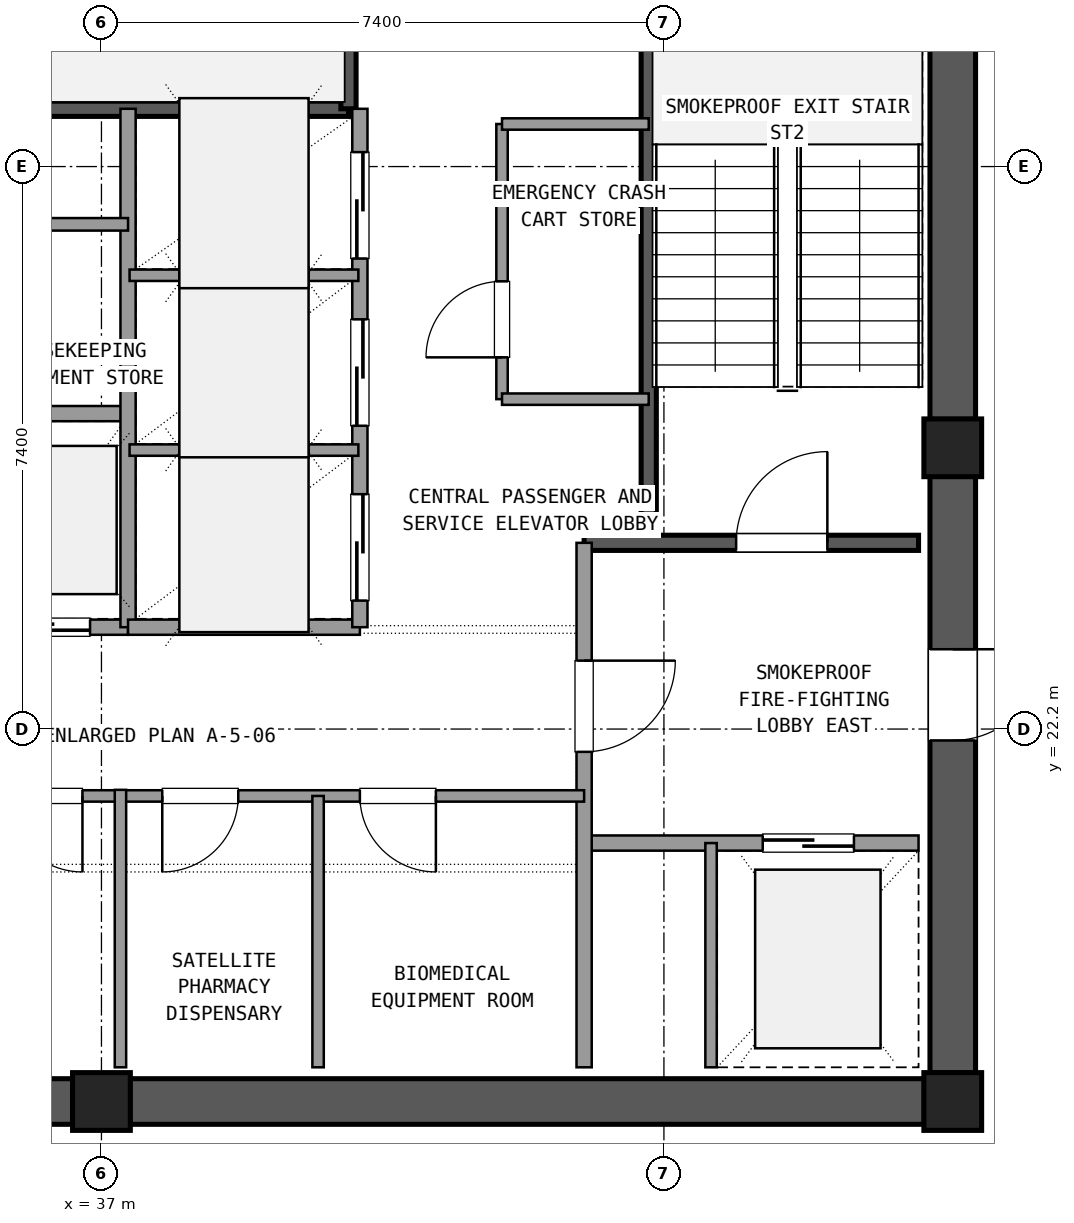
"""IFC4 building model, lengths in metres.
Left out: names, types, materials, properties, quantities, classifications, styles, units other than length and angle.
Written with IfcOpenShell. Run it as: python <this file> out.ifc"""

import sys

from ifc_helpers import new_model, si_unit, direction, frame, frame_2d, origin, origin_2d, place, context, subcontext, project, spatial, rectangle, extrude, element, fill, save


model = new_model("IFC4")
c1 = context("Model", 3, precision=1e-05, world=origin(), true_north=direction((0.0, 1.0)))
c2 = subcontext(c1, "Body", "Model", "MODEL_VIEW")
j1 = project(units=[si_unit("LENGTHUNIT", "METRE"), si_unit("PLANEANGLEUNIT", "RADIAN")], contexts=[c1])
p1 = place(None, origin())
s1 = spatial("IfcSite", under=j1, at=p1, CompositionType="ELEMENT")
p2 = place(p1, origin())
s2 = spatial("IfcBuilding", under=s1, at=p2, CompositionType="ELEMENT")
p3 = place(p2, frame((0.0, 0.0, 290.34)))
s3 = spatial("IfcBuildingStorey", under=s2, at=p3, CompositionType="ELEMENT", Elevation=290.34)
for number, where, z_axis, x_axis in (
    (1, (37.0, 17.3, 0.0), (0.0, 0.0, 1.0), (1.0, 0.0, 0.0)),
    (2, (48.2, 17.3, 0.0), (0.0, 0.0, 1.0), (1.0, 0.0, 0.0)),
    (3, (48.2, 25.9, 0.0), (0.0, 0.0, 1.0), (1.0, 0.0, 0.0)),
):
    element("IfcColumn", number, at=place(p3, frame(where, z_axis=z_axis, x_axis=x_axis)), inside=s3, PredefinedType="COLUMN", context=c2, shape_type="SweptSolid", body=[
        extrude(rectangle(XDim=0.76, YDim=0.76, at=origin_2d()), origin(), (0.0, 0.0, 1.0), 4.32),
    ])
for number, where, z_axis, x_axis in (
    (4, (26.175, 17.3, 0.0), (0.0, 0.0, 1.0), (1.0, 0.0, 0.0)),
    (5, (37.375, 17.3, 0.0), (0.0, 0.0, 1.0), (1.0, 0.0, 0.0)),
):
    element("IfcWall", number, at=place(p3, frame(where, z_axis=z_axis, x_axis=x_axis)), inside=s3, PredefinedType="SHEAR", context=c2, shape_type="SweptSolid", body=[
        extrude(rectangle(XDim=10.45, YDim=0.6, at=frame_2d((5.225, 0.0))), origin(), (0.0, 0.0, 1.0), 4.02),
    ])
p4 = place(p3, frame((48.2, 17.675, 0.0), z_axis=(0.0, 0.0, 1.0), x_axis=(0.0, 1.0, 0.0)))
e6 = element("IfcWall", 6, at=p4, inside=s3, PredefinedType="SHEAR", context=c2, shape_type="SweptSolid", body=[
    extrude(rectangle(XDim=7.85, YDim=0.6, at=frame_2d((3.925, 0.0))), origin(), (0.0, 0.0, 1.0), 4.02),
])
p5 = place(p4, frame((4.375, 0.0, 0.0)))
e7 = element("IfcOpeningElement", 7, at=p5, cuts=e6, PredefinedType="OPENING", context=c2, shape_type="SweptSolid", body=[
    extrude(rectangle(XDim=1.2, YDim=2.15, at=frame_2d((0.6, 1.075))), frame((0.0, 0.31, 0.0), z_axis=(0.0, -1.0, 0.0), x_axis=(1.0, 0.0, 0.0)), (0.0, 0.0, 1.0), 0.62),
])
p6 = place(p3, frame((48.2, 26.275, 0.0), z_axis=(0.0, 0.0, 1.0), x_axis=(0.0, 1.0, 0.0)))
e8 = element("IfcWall", 8, at=p6, inside=s3, PredefinedType="SHEAR", context=c2, shape_type="SweptSolid", body=[
    extrude(rectangle(XDim=7.85, YDim=0.6, at=frame_2d((3.925, 0.0))), origin(), (0.0, 0.0, 1.0), 4.02),
])
p7 = place(p3, frame((44.2, 24.65, 0.0), z_axis=(0.0, 0.0, 1.0), x_axis=(0.0, 1.0, 0.0)))
e9 = element("IfcWall", 9, at=p7, inside=s3, PredefinedType="SHEAR", context=c2, shape_type="SweptSolid", body=[
    extrude(rectangle(XDim=9.4, YDim=0.2, at=frame_2d((4.7, 0.0))), origin(), (0.0, 0.0, 1.0), 4.02),
])
p8 = place(p3, frame((43.35, 24.65, 0.0), z_axis=(0.0, 0.0, 1.0), x_axis=(1.0, 0.0, 0.0)))
e10 = element("IfcWall", 10, at=p8, inside=s3, PredefinedType="SHEAR", context=c2, shape_type="SweptSolid", body=[
    extrude(rectangle(XDim=4.4, YDim=0.2, at=frame_2d((2.2, 0.0))), origin(), (0.0, 0.0, 1.0), 4.02),
])
p9 = place(p8, frame((2.0, 0.0, 0.0)))
e11 = element("IfcOpeningElement", 11, at=p9, cuts=e10, PredefinedType="OPENING", context=c2, shape_type="SweptSolid", body=[
    extrude(rectangle(XDim=1.2, YDim=2.15, at=frame_2d((0.6, 1.075))), frame((0.0, 0.11, 0.0), z_axis=(0.0, -1.0, 0.0), x_axis=(1.0, 0.0, 0.0)), (0.0, 0.0, 1.0), 0.22),
])
p10 = place(p3, frame((30.75, 30.36, 0.0), z_axis=(0.0, 0.0, 1.0), x_axis=(1.0, 0.0, 0.0)))
e12 = element("IfcWall", 12, at=p10, inside=s3, PredefinedType="SHEAR", context=c2, shape_type="SweptSolid", body=[
    extrude(rectangle(XDim=9.5, YDim=0.2, at=frame_2d((4.75, 0.0))), origin(), (0.0, 0.0, 1.0), 4.02),
])
p11 = place(p3, frame((40.25, 30.36, 0.0), z_axis=(0.0, 0.0, 1.0), x_axis=(0.0, 1.0, 0.0)))
e13 = element("IfcWall", 13, at=p11, inside=s3, PredefinedType="SHEAR", context=c2, shape_type="SweptSolid", body=[
    extrude(rectangle(XDim=3.69, YDim=0.2, at=frame_2d((1.845, 0.0))), origin(), (0.0, 0.0, 1.0), 4.02),
])
p12 = place(p3, frame((43.35, 20.7, 0.0), z_axis=(0.0, 0.0, 1.0), x_axis=(1.0, 0.0, 0.0)))
e14 = element("IfcWall", 14, at=p12, inside=s3, PredefinedType="SOLIDWALL", context=c2, shape_type="SweptSolid", body=[
    extrude(rectangle(XDim=4.4, YDim=0.2, at=frame_2d((2.2, 0.0))), origin(), (0.0, 0.0, 1.0), 2.93),
])
p13 = place(p12, frame((2.35, 0.0, 0.0)))
e15 = element("IfcOpeningElement", 15, at=p13, cuts=e14, PredefinedType="OPENING", context=c2, shape_type="SweptSolid", body=[
    extrude(rectangle(XDim=1.2, YDim=2.15, at=frame_2d((0.6, 1.075))), frame((0.0, 0.11, 0.0), z_axis=(0.0, -1.0, 0.0), x_axis=(1.0, 0.0, 0.0)), (0.0, 0.0, 1.0), 0.22),
])
p14 = place(p3, frame((43.35, 17.75, 0.0), z_axis=(0.0, 0.0, 1.0), x_axis=(0.0, 1.0, 0.0)))
e16 = element("IfcWall", 16, at=p14, inside=s3, PredefinedType="SOLIDWALL", context=c2, shape_type="SweptSolid", body=[
    extrude(rectangle(XDim=6.9, YDim=0.2, at=frame_2d((3.45, 0.0))), origin(), (0.0, 0.0, 1.0), 2.93),
])
p15 = place(p14, frame((4.15, 0.0, 0.0)))
e17 = element("IfcOpeningElement", 17, at=p15, cuts=e16, PredefinedType="OPENING", context=c2, shape_type="SweptSolid", body=[
    extrude(rectangle(XDim=1.2, YDim=2.15, at=frame_2d((0.6, 1.075))), frame((0.0, 0.11, 0.0), z_axis=(0.0, -1.0, 0.0), x_axis=(1.0, 0.0, 0.0)), (0.0, 0.0, 1.0), 0.22),
])
p16 = place(p3, frame((45.02, 17.75, 0.0), z_axis=(0.0, 0.0, 1.0), x_axis=(0.0, 1.0, 0.0)))
e18 = element("IfcWall", 18, at=p16, inside=s3, PredefinedType="PARTITIONING", context=c2, shape_type="SweptSolid", body=[
    extrude(rectangle(XDim=2.95, YDim=0.15, at=frame_2d((1.475, 0.0))), origin(), (0.0, 0.0, 1.0), 2.93),
])
p17 = place(p3, frame((30.25, 21.32, 0.0), z_axis=(0.0, 0.0, 1.0), x_axis=(1.0, 0.0, 0.0)))
e19 = element("IfcWall", 19, at=p17, inside=s3, PredefinedType="PARTITIONING", context=c2, shape_type="SweptSolid", body=[
    extrude(rectangle(XDim=7.0, YDim=0.15, at=frame_2d((3.5, 0.0))), origin(), (0.0, 0.0, 1.0), 2.93),
])
p18 = place(p17, frame((0.7, 0.0, 0.0)))
e20 = element("IfcOpeningElement", 20, at=p18, cuts=e19, PredefinedType="OPENING", context=c2, shape_type="SweptSolid", body=[
    extrude(rectangle(XDim=1.0, YDim=2.15, at=frame_2d((0.5, 1.075))), frame((0.0, 0.085, 0.0), z_axis=(0.0, -1.0, 0.0), x_axis=(1.0, 0.0, 0.0)), (0.0, 0.0, 1.0), 0.17),
])
p19 = place(p17, frame((5.5, 0.0, 0.0)))
e21 = element("IfcOpeningElement", 21, at=p19, cuts=e19, PredefinedType="OPENING", context=c2, shape_type="SweptSolid", body=[
    extrude(rectangle(XDim=1.0, YDim=2.15, at=frame_2d((0.5, 1.075))), frame((0.0, 0.085, 0.0), z_axis=(0.0, -1.0, 0.0), x_axis=(1.0, 0.0, 0.0)), (0.0, 0.0, 1.0), 0.17),
])
p20 = place(p3, frame((37.25, 21.32, 0.0), z_axis=(0.0, 0.0, 1.0), x_axis=(1.0, 0.0, 0.0)))
e22 = element("IfcWall", 22, at=p20, inside=s3, PredefinedType="PARTITIONING", context=c2, shape_type="SweptSolid", body=[
    extrude(rectangle(XDim=6.1, YDim=0.15, at=frame_2d((3.05, 0.0))), origin(), (0.0, 0.0, 1.0), 2.93),
])
p21 = place(p20, frame((0.55, 0.0, 0.0)))
e23 = element("IfcOpeningElement", 23, at=p21, cuts=e22, PredefinedType="OPENING", context=c2, shape_type="SweptSolid", body=[
    extrude(rectangle(XDim=1.0, YDim=2.15, at=frame_2d((0.5, 1.075))), frame((0.0, 0.085, 0.0), z_axis=(0.0, -1.0, 0.0), x_axis=(1.0, 0.0, 0.0)), (0.0, 0.0, 1.0), 0.17),
])
p22 = place(p20, frame((3.15, 0.0, 0.0)))
e24 = element("IfcOpeningElement", 24, at=p22, cuts=e22, PredefinedType="OPENING", context=c2, shape_type="SweptSolid", body=[
    extrude(rectangle(XDim=1.0, YDim=2.15, at=frame_2d((0.5, 1.075))), frame((0.0, 0.085, 0.0), z_axis=(0.0, -1.0, 0.0), x_axis=(1.0, 0.0, 0.0)), (0.0, 0.0, 1.0), 0.17),
])
p23 = place(p3, frame((39.85, 17.75, 0.0), z_axis=(0.0, 0.0, 1.0), x_axis=(0.0, 1.0, 0.0)))
e25 = element("IfcWall", 25, at=p23, inside=s3, PredefinedType="PARTITIONING", context=c2, shape_type="SweptSolid", body=[
    extrude(rectangle(XDim=3.57, YDim=0.15, at=frame_2d((1.785, 0.0))), origin(), (0.0, 0.0, 1.0), 2.93),
])
p24 = place(p3, frame((37.25, 17.75, 0.0), z_axis=(0.0, 0.0, 1.0), x_axis=(0.0, 1.0, 0.0)))
e26 = element("IfcWall", 26, at=p24, inside=s3, PredefinedType="PARTITIONING", context=c2, shape_type="SweptSolid", body=[
    extrude(rectangle(XDim=3.65, YDim=0.15, at=frame_2d((1.825, 0.0))), origin(), (0.0, 0.0, 1.0), 2.93),
])
p25 = place(p3, frame((31.45, 23.54, 0.0), z_axis=(0.0, 0.0, 1.0), x_axis=(1.0, 0.0, 0.0)))
e27 = element("IfcWall", 27, at=p25, inside=s3, PredefinedType="SOLIDWALL", context=c2, shape_type="SweptSolid", body=[
    extrude(rectangle(XDim=5.9, YDim=0.2, at=frame_2d((2.95, 0.0))), origin(), (0.0, 0.0, 1.0), 2.93),
])
p26 = place(p25, frame((0.4, 0.0, 0.0)))
e28 = element("IfcOpeningElement", 28, at=p26, cuts=e27, PredefinedType="OPENING", context=c2, shape_type="SweptSolid", body=[
    extrude(rectangle(XDim=1.1, YDim=2.15, at=frame_2d((0.55, 1.075))), frame((0.0, 0.11, 0.0), z_axis=(0.0, -1.0, 0.0), x_axis=(1.0, 0.0, 0.0)), (0.0, 0.0, 1.0), 0.22),
])
p27 = place(p25, frame((2.35, 0.0, 0.0)))
e29 = element("IfcOpeningElement", 29, at=p27, cuts=e27, PredefinedType="OPENING", context=c2, shape_type="SweptSolid", body=[
    extrude(rectangle(XDim=1.1, YDim=2.15, at=frame_2d((0.55, 1.075))), frame((0.0, 0.11, 0.0), z_axis=(0.0, -1.0, 0.0), x_axis=(1.0, 0.0, 0.0)), (0.0, 0.0, 1.0), 0.22),
])
p28 = place(p25, frame((4.3, 0.0, 0.0)))
e30 = element("IfcOpeningElement", 30, at=p28, cuts=e27, PredefinedType="OPENING", context=c2, shape_type="SweptSolid", body=[
    extrude(rectangle(XDim=1.1, YDim=2.15, at=frame_2d((0.55, 1.075))), frame((0.0, 0.11, 0.0), z_axis=(0.0, -1.0, 0.0), x_axis=(1.0, 0.0, 0.0)), (0.0, 0.0, 1.0), 0.22),
])
p29 = place(p3, frame((31.45, 26.35, 0.0), z_axis=(0.0, 0.0, 1.0), x_axis=(1.0, 0.0, 0.0)))
e31 = element("IfcWall", 31, at=p29, inside=s3, PredefinedType="SOLIDWALL", context=c2, shape_type="SweptSolid", body=[
    extrude(rectangle(XDim=5.9, YDim=0.2, at=frame_2d((2.95, 0.0))), origin(), (0.0, 0.0, 1.0), 2.93),
])
p30 = place(p3, frame((37.35, 23.54, 0.0), z_axis=(0.0, 0.0, 1.0), x_axis=(0.0, 1.0, 0.0)))
e32 = element("IfcWall", 32, at=p30, inside=s3, PredefinedType="SOLIDWALL", context=c2, shape_type="SweptSolid", body=[
    extrude(rectangle(XDim=6.82, YDim=0.2, at=frame_2d((3.41, 0.0))), origin(), (0.0, 0.0, 1.0), 2.93),
])
p31 = place(p3, frame((37.35, 23.54, 0.0), z_axis=(0.0, 0.0, 1.0), x_axis=(1.0, 0.0, 0.0)))
e33 = element("IfcWall", 33, at=p31, inside=s3, PredefinedType="SOLIDWALL", context=c2, shape_type="SweptSolid", body=[
    extrude(rectangle(XDim=3.05, YDim=0.2, at=frame_2d((1.525, 0.0))), origin(), (0.0, 0.0, 1.0), 2.93),
])
p32 = place(p3, frame((40.4, 23.54, 0.0), z_axis=(0.0, 0.0, 1.0), x_axis=(0.0, 1.0, 0.0)))
e34 = element("IfcWall", 34, at=p32, inside=s3, PredefinedType="SOLIDWALL", context=c2, shape_type="SweptSolid", body=[
    extrude(rectangle(XDim=6.82, YDim=0.2, at=frame_2d((3.41, 0.0))), origin(), (0.0, 0.0, 1.0), 2.93),
])
p33 = place(p32, frame((0.35, 0.0, 0.0)))
e35 = element("IfcOpeningElement", 35, at=p33, cuts=e34, PredefinedType="OPENING", context=c2, shape_type="SweptSolid", body=[
    extrude(rectangle(XDim=1.4, YDim=2.2, at=frame_2d((0.7, 1.1))), frame((0.0, 0.11, 0.0), z_axis=(0.0, -1.0, 0.0), x_axis=(1.0, 0.0, 0.0)), (0.0, 0.0, 1.0), 0.22),
])
p34 = place(p32, frame((2.65, 0.0, 0.0)))
e36 = element("IfcOpeningElement", 36, at=p34, cuts=e34, PredefinedType="OPENING", context=c2, shape_type="SweptSolid", body=[
    extrude(rectangle(XDim=1.4, YDim=2.2, at=frame_2d((0.7, 1.1))), frame((0.0, 0.11, 0.0), z_axis=(0.0, -1.0, 0.0), x_axis=(1.0, 0.0, 0.0)), (0.0, 0.0, 1.0), 0.22),
])
p35 = place(p32, frame((4.85, 0.0, 0.0)))
e37 = element("IfcOpeningElement", 37, at=p35, cuts=e34, PredefinedType="OPENING", context=c2, shape_type="SweptSolid", body=[
    extrude(rectangle(XDim=1.4, YDim=2.2, at=frame_2d((0.7, 1.1))), frame((0.0, 0.11, 0.0), z_axis=(0.0, -1.0, 0.0), x_axis=(1.0, 0.0, 0.0)), (0.0, 0.0, 1.0), 0.22),
])
for number, where, z_axis, x_axis in (
    (38, (37.37, 25.87, 0.0), (0.0, 0.0, 1.0), (1.0, 0.0, 0.0)),
    (39, (37.37, 28.17, 0.0), (0.0, 0.0, 1.0), (1.0, 0.0, 0.0)),
):
    element("IfcWall", number, at=place(p3, frame(where, z_axis=z_axis, x_axis=x_axis)), inside=s3, PredefinedType="PARTITIONING", context=c2, shape_type="SweptSolid", body=[
        extrude(rectangle(XDim=3.01, YDim=0.15, at=frame_2d((1.505, 0.0))), origin(), (0.0, 0.0, 1.0), 2.93),
    ])
p36 = place(p3, frame((42.27, 26.54, 0.0), z_axis=(0.0, 0.0, 1.0), x_axis=(0.0, 1.0, 0.0)))
e40 = element("IfcWall", 40, at=p36, inside=s3, PredefinedType="PARTITIONING", context=c2, shape_type="SweptSolid", body=[
    extrude(rectangle(XDim=3.62, YDim=0.15, at=frame_2d((1.81, 0.0))), origin(), (0.0, 0.0, 1.0), 2.93),
])
p37 = place(p36, frame((0.55, 0.0, 0.0)))
e41 = element("IfcOpeningElement", 41, at=p37, cuts=e40, PredefinedType="OPENING", context=c2, shape_type="SweptSolid", body=[
    extrude(rectangle(XDim=1.0, YDim=2.15, at=frame_2d((0.5, 1.075))), frame((0.0, 0.085, 0.0), z_axis=(0.0, -1.0, 0.0), x_axis=(1.0, 0.0, 0.0)), (0.0, 0.0, 1.0), 0.17),
])
for number, where, z_axis, x_axis in (
    (42, (42.27, 26.54, 0.0), (0.0, 0.0, 1.0), (1.0, 0.0, 0.0)),
    (43, (42.27, 30.16, 0.0), (0.0, 0.0, 1.0), (1.0, 0.0, 0.0)),
):
    element("IfcWall", number, at=place(p3, frame(where, z_axis=z_axis, x_axis=x_axis)), inside=s3, PredefinedType="PARTITIONING", context=c2, shape_type="SweptSolid", body=[
        extrude(rectangle(XDim=1.93, YDim=0.15, at=frame_2d((0.965, 0.0))), origin(), (0.0, 0.0, 1.0), 2.93),
    ])
p38 = place(p3, frame((31.48, 28.84, 0.0), z_axis=(0.0, 0.0, 1.0), x_axis=(1.0, 0.0, 0.0)))
e44 = element("IfcWall", 44, at=p38, inside=s3, PredefinedType="PLUMBINGWALL", context=c2, shape_type="SweptSolid", body=[
    extrude(rectangle(XDim=5.87, YDim=0.165, at=frame_2d((2.935, 0.0))), origin(), (0.0, 0.0, 1.0), 2.93),
])
p39 = place(p38, frame((0.7, 0.0, 0.0)))
e45 = element("IfcOpeningElement", 45, at=p39, cuts=e44, PredefinedType="OPENING", context=c2, shape_type="SweptSolid", body=[
    extrude(rectangle(XDim=0.95, YDim=2.1, at=frame_2d((0.475, 1.05))), frame((0.0, 0.093, 0.0), z_axis=(0.0, -1.0, 0.0), x_axis=(1.0, 0.0, 0.0)), (0.0, 0.0, 1.0), 0.185),
])
p40 = place(p38, frame((3.4, 0.0, 0.0)))
e46 = element("IfcOpeningElement", 46, at=p40, cuts=e44, PredefinedType="OPENING", context=c2, shape_type="SweptSolid", body=[
    extrude(rectangle(XDim=0.95, YDim=2.1, at=frame_2d((0.475, 1.05))), frame((0.0, 0.093, 0.0), z_axis=(0.0, -1.0, 0.0), x_axis=(1.0, 0.0, 0.0)), (0.0, 0.0, 1.0), 0.185),
])
p41 = place(p9, origin())
e47 = element("IfcDoor", 47, at=p41, inside=s3, OperationType="SINGLE_SWING_RIGHT", PredefinedType="DOOR", context=c2, shape_type="SweptSolid", body=[
    extrude(rectangle(XDim=1.2, YDim=2.15, at=frame_2d((0.6, 1.075))), frame((0.0, 0.025, 0.0), z_axis=(0.0, -1.0, 0.0), x_axis=(1.0, 0.0, 0.0)), (0.0, 0.0, 1.0), 0.05),
])
fill(e11, e47)
p42 = place(p13, origin())
e48 = element("IfcDoor", 48, at=p42, inside=s3, OperationType="SLIDING_TO_RIGHT", PredefinedType="DOOR", context=c2, shape_type="SweptSolid", body=[
    extrude(rectangle(XDim=1.2, YDim=2.15, at=frame_2d((0.6, 1.075))), frame((0.0, 0.025, 0.0), z_axis=(0.0, -1.0, 0.0), x_axis=(1.0, 0.0, 0.0)), (0.0, 0.0, 1.0), 0.05),
])
fill(e15, e48)
p43 = place(p15, frame((1.2, 0.0, 0.0), z_axis=(0.0, 0.0, 1.0), x_axis=(-1.0, 0.0, 0.0)))
e49 = element("IfcDoor", 49, at=p43, inside=s3, OperationType="SINGLE_SWING_RIGHT", PredefinedType="DOOR", context=c2, shape_type="SweptSolid", body=[
    extrude(rectangle(XDim=1.2, YDim=2.15, at=frame_2d((0.6, 1.075))), frame((0.0, 0.025, 0.0), z_axis=(0.0, -1.0, 0.0), x_axis=(1.0, 0.0, 0.0)), (0.0, 0.0, 1.0), 0.05),
])
fill(e17, e49)
p44 = place(p5, frame((1.2, 0.0, 0.0), z_axis=(0.0, 0.0, 1.0), x_axis=(-1.0, 0.0, 0.0)))
e50 = element("IfcDoor", 50, at=p44, inside=s3, OperationType="SINGLE_SWING_RIGHT", PredefinedType="DOOR", context=c2, shape_type="SweptSolid", body=[
    extrude(rectangle(XDim=1.2, YDim=2.15, at=frame_2d((0.6, 1.075))), frame((0.0, 0.025, 0.0), z_axis=(0.0, -1.0, 0.0), x_axis=(1.0, 0.0, 0.0)), (0.0, 0.0, 1.0), 0.05),
])
fill(e7, e50)
p45 = place(p19, frame((1.0, 0.0, 0.0), z_axis=(0.0, 0.0, 1.0), x_axis=(-1.0, 0.0, 0.0)))
e51 = element("IfcDoor", 51, at=p45, inside=s3, OperationType="SINGLE_SWING_RIGHT", PredefinedType="DOOR", context=c2, shape_type="SweptSolid", body=[
    extrude(rectangle(XDim=1.0, YDim=2.15, at=frame_2d((0.5, 1.075))), frame((0.0, 0.025, 0.0), z_axis=(0.0, -1.0, 0.0), x_axis=(1.0, 0.0, 0.0)), (0.0, 0.0, 1.0), 0.05),
])
fill(e21, e51)
p46 = place(p21, frame((1.0, 0.0, 0.0), z_axis=(0.0, 0.0, 1.0), x_axis=(-1.0, 0.0, 0.0)))
e52 = element("IfcDoor", 52, at=p46, inside=s3, OperationType="SINGLE_SWING_LEFT", PredefinedType="DOOR", context=c2, shape_type="SweptSolid", body=[
    extrude(rectangle(XDim=1.0, YDim=2.15, at=frame_2d((0.5, 1.075))), frame((0.0, 0.025, 0.0), z_axis=(0.0, -1.0, 0.0), x_axis=(1.0, 0.0, 0.0)), (0.0, 0.0, 1.0), 0.05),
])
fill(e23, e52)
p47 = place(p22, frame((1.0, 0.0, 0.0), z_axis=(0.0, 0.0, 1.0), x_axis=(-1.0, 0.0, 0.0)))
e53 = element("IfcDoor", 53, at=p47, inside=s3, OperationType="SINGLE_SWING_RIGHT", PredefinedType="DOOR", context=c2, shape_type="SweptSolid", body=[
    extrude(rectangle(XDim=1.0, YDim=2.15, at=frame_2d((0.5, 1.075))), frame((0.0, 0.025, 0.0), z_axis=(0.0, -1.0, 0.0), x_axis=(1.0, 0.0, 0.0)), (0.0, 0.0, 1.0), 0.05),
])
fill(e24, e53)
p48 = place(p28, origin())
e54 = element("IfcDoor", 54, at=p48, inside=s3, OperationType="SLIDING_TO_RIGHT", PredefinedType="DOOR", context=c2, shape_type="SweptSolid", body=[
    extrude(rectangle(XDim=1.1, YDim=2.15, at=frame_2d((0.55, 1.075))), frame((0.0, 0.025, 0.0), z_axis=(0.0, -1.0, 0.0), x_axis=(1.0, 0.0, 0.0)), (0.0, 0.0, 1.0), 0.05),
])
fill(e30, e54)
p49 = place(p33, origin())
e55 = element("IfcDoor", 55, at=p49, inside=s3, OperationType="SLIDING_TO_LEFT", PredefinedType="DOOR", context=c2, shape_type="SweptSolid", body=[
    extrude(rectangle(XDim=1.4, YDim=2.2, at=frame_2d((0.7, 1.1))), frame((0.0, 0.025, 0.0), z_axis=(0.0, -1.0, 0.0), x_axis=(1.0, 0.0, 0.0)), (0.0, 0.0, 1.0), 0.05),
])
fill(e35, e55)
p50 = place(p34, origin())
e56 = element("IfcDoor", 56, at=p50, inside=s3, OperationType="SLIDING_TO_LEFT", PredefinedType="DOOR", context=c2, shape_type="SweptSolid", body=[
    extrude(rectangle(XDim=1.4, YDim=2.2, at=frame_2d((0.7, 1.1))), frame((0.0, 0.025, 0.0), z_axis=(0.0, -1.0, 0.0), x_axis=(1.0, 0.0, 0.0)), (0.0, 0.0, 1.0), 0.05),
])
fill(e36, e56)
p51 = place(p35, origin())
e57 = element("IfcDoor", 57, at=p51, inside=s3, OperationType="SLIDING_TO_RIGHT", PredefinedType="DOOR", context=c2, shape_type="SweptSolid", body=[
    extrude(rectangle(XDim=1.4, YDim=2.2, at=frame_2d((0.7, 1.1))), frame((0.0, 0.025, 0.0), z_axis=(0.0, -1.0, 0.0), x_axis=(1.0, 0.0, 0.0)), (0.0, 0.0, 1.0), 0.05),
])
fill(e37, e57)
p52 = place(p37, origin())
e58 = element("IfcDoor", 58, at=p52, inside=s3, OperationType="SINGLE_SWING_LEFT", PredefinedType="DOOR", context=c2, shape_type="SweptSolid", body=[
    extrude(rectangle(XDim=1.0, YDim=2.15, at=frame_2d((0.5, 1.075))), frame((0.0, 0.025, 0.0), z_axis=(0.0, -1.0, 0.0), x_axis=(1.0, 0.0, 0.0)), (0.0, 0.0, 1.0), 0.05),
])
fill(e41, e58)
save(model, sys.argv[1])
